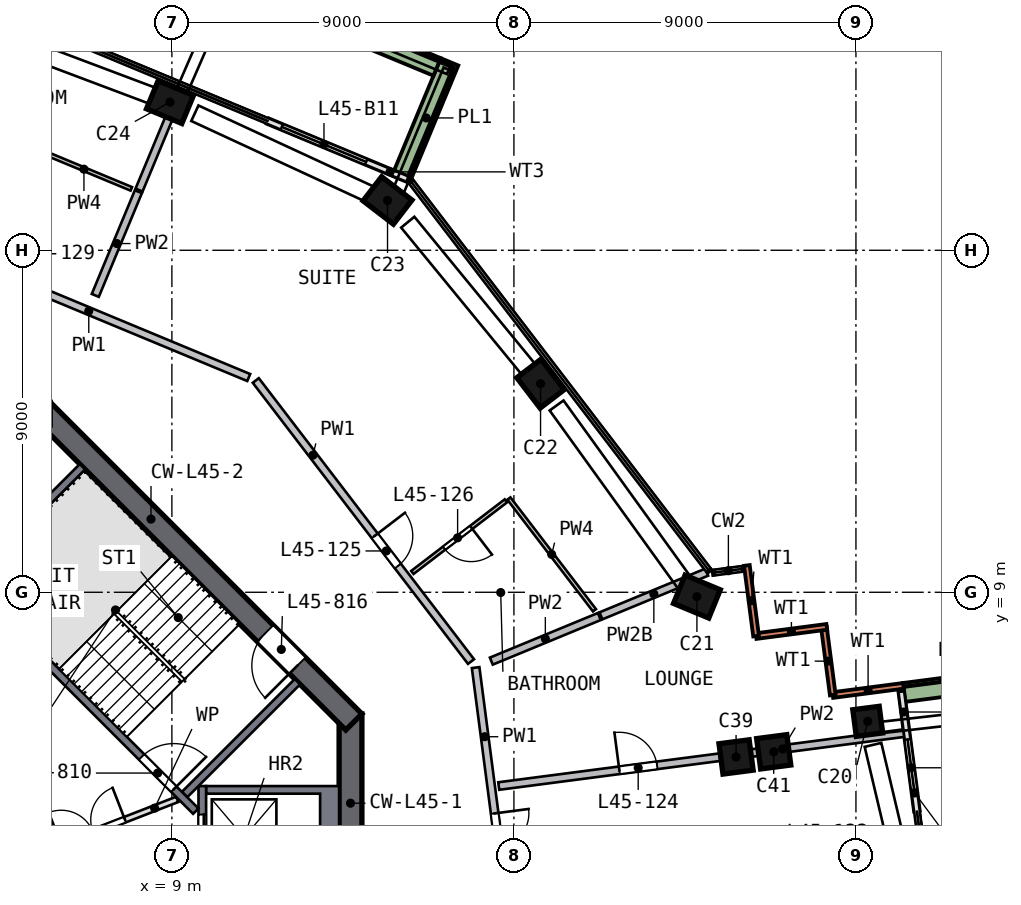
"""IFC4 building model, lengths in metres.
Left out: names, types, materials, properties, quantities, classifications, styles, units other than length and angle.
Written with IfcOpenShell. Run it as: python <this file> out.ifc"""

import sys

from ifc_helpers import new_model, si_unit, direction, frame, frame_2d, origin, origin_2d, place, context, subcontext, project, spatial, polyline, rectangle, outline, extrude, element, fill, save


model = new_model("IFC4")
c1 = context("Model", 3, precision=1e-05, world=origin(), true_north=direction((0.0, 1.0)))
c2 = subcontext(c1, "Body", "Model", "MODEL_VIEW")
j1 = project(units=[si_unit("LENGTHUNIT", "METRE"), si_unit("PLANEANGLEUNIT", "RADIAN")], contexts=[c1])
p1 = place(None, origin())
s1 = spatial("IfcSite", under=j1, at=p1, CompositionType="ELEMENT")
p2 = place(p1, origin())
s2 = spatial("IfcBuilding", under=s1, at=p2, CompositionType="ELEMENT")
p3 = place(p2, frame((0.0, 0.0, 187.0)))
s3 = spatial("IfcBuildingStorey", under=s2, at=p3, CompositionType="ELEMENT", Elevation=187.0)
p4 = place(p3, frame((27.343, 5.447, 0.0), z_axis=(-0.026931042, 0.129496589, 0.99121408), x_axis=(-0.127096321, 0.983083016, -0.131887487)))
e1 = element("IfcColumn", 1, at=p4, inside=s3, PredefinedType="COLUMN", context=c2, shape_type="SweptSolid", body=[
    extrude(rectangle(XDim=0.7, YDim=0.7, at=origin_2d()), origin(), (0.0, 0.0, 1.0), 3.218),
])
p5 = place(p3, frame((22.867, 8.755, 0.0), z_axis=(-0.042567716, 0.108395649, 0.993196039), x_axis=(0.923130304, -0.375945377, 0.080594756)))
e2 = element("IfcColumn", 2, at=p5, inside=s3, PredefinedType="COLUMN", context=c2, shape_type="SweptSolid", body=[
    extrude(rectangle(XDim=1.0, YDim=0.8, at=origin_2d()), origin(), (0.0, 0.0, 1.0), 3.212),
])
p6 = place(p3, frame((18.784, 14.383, 0.0), z_axis=(-0.069128268, 0.088748833, 0.993652317), x_axis=(-0.603927899, 0.789060783, -0.112490769)))
e3 = element("IfcColumn", 3, at=p6, inside=s3, PredefinedType="COLUMN", context=c2, shape_type="SweptSolid", body=[
    extrude(rectangle(XDim=1.0, YDim=0.8, at=origin_2d()), origin(), (0.0, 0.0, 1.0), 3.21),
])
p7 = place(p3, frame((14.785, 19.227, 0.0), z_axis=(-0.091988832, 0.069561803, 0.993327343), x_axis=(0.787183589, -0.605840039, 0.115324949)))
e4 = element("IfcColumn", 4, at=p7, inside=s3, PredefinedType="COLUMN", context=c2, shape_type="SweptSolid", body=[
    extrude(rectangle(XDim=1.0, YDim=0.8, at=origin_2d()), origin(), (0.0, 0.0, 1.0), 3.211),
])
p8 = place(p3, frame((9.076, 21.848, 0.0), z_axis=(-0.104262249, 0.042358915, 0.993647375), x_axis=(-0.917367434, 0.381802301, -0.112534412)))
e5 = element("IfcColumn", 5, at=p8, inside=s3, PredefinedType="COLUMN", context=c2, shape_type="SweptSolid", body=[
    extrude(rectangle(XDim=1.0, YDim=0.8, at=origin_2d()), origin(), (0.0, 0.0, 1.0), 3.21),
])
p9 = place(p3, frame((23.873, 4.529, 0.0), z_axis=(-0.022502444, 0.113348458, 0.993300441), x_axis=(0.991425484, 0.130453641, 0.007573516)))
e6 = element("IfcColumn", 6, at=p9, inside=s3, PredefinedType="COLUMN", context=c2, shape_type="SweptSolid", body=[
    extrude(rectangle(XDim=0.8, YDim=0.8, at=origin_2d()), origin(), (0.0, 0.0, 1.0), 3.211),
])
p10 = place(p3, frame((24.865, 4.659, 0.0), z_axis=(-0.023173643, 0.117995632, 0.992743679), x_axis=(0.991390473, 0.130717602, 0.007605209)))
e7 = element("IfcColumn", 7, at=p10, inside=s3, PredefinedType="COLUMN", context=c2, shape_type="SweptSolid", body=[
    extrude(rectangle(XDim=0.8, YDim=0.8, at=origin_2d()), origin(), (0.0, 0.0, 1.0), 3.213),
])
p11 = place(p3, frame((13.7, -5.799, 0.0), z_axis=(0.0, 0.0, 1.0), x_axis=(0.0, 1.0, 0.0)))
e8 = element("IfcWall", 8, at=p11, inside=s3, PredefinedType="SHEAR", context=c2, shape_type="SweptSolid", body=[
    extrude(rectangle(XDim=11.598, YDim=0.6, at=frame_2d((5.799, 0.0))), origin(), (0.0, 0.0, 1.0), 3.5),
])
p12 = place(p11, frame((4.899, 0.0, 0.0)))
e9 = element("IfcOpeningElement", 9, at=p12, cuts=e8, PredefinedType="OPENING", context=c2, shape_type="SweptSolid", body=[
    extrude(rectangle(XDim=1.8, YDim=2.1, at=frame_2d((0.9, 1.05))), frame((0.0, 0.31, 0.0), z_axis=(0.0, -1.0, 0.0), x_axis=(1.0, 0.0, 0.0)), (0.0, 0.0, 1.0), 0.62),
])
p13 = place(p3, frame((13.788, 5.587, 0.0), z_axis=(0.0, 0.0, 1.0), x_axis=(-0.707106781, 0.707106781, 0.0)))
e10 = element("IfcWall", 10, at=p13, inside=s3, PredefinedType="SHEAR", context=c2, shape_type="SweptSolid", body=[
    extrude(rectangle(XDim=11.598, YDim=0.6, at=frame_2d((5.799, 0.0))), origin(), (0.0, 0.0, 1.0), 3.5),
])
p14 = place(p13, frame((2.099, 0.0, 0.0)))
e11 = element("IfcOpeningElement", 11, at=p14, cuts=e10, PredefinedType="OPENING", context=c2, shape_type="SweptSolid", body=[
    extrude(rectangle(XDim=1.2, YDim=2.1, at=frame_2d((0.6, 1.05))), frame((0.0, 0.31, 0.0), z_axis=(0.0, -1.0, 0.0), x_axis=(1.0, 0.0, 0.0)), (0.0, 0.0, 1.0), 0.62),
])
p15 = place(p3, frame((28.25, 6.538, 0.0), z_axis=(0.0, 0.0, 1.0), x_axis=(-0.991571342, -0.12956185, 0.0)))
e12 = element("IfcWall", 12, at=p15, inside=s3, PredefinedType="SOLIDWALL", context=c2, shape_type="SweptSolid", body=[
    extrude(rectangle(XDim=1.875, YDim=0.15, at=frame_2d((0.938, 0.0))), origin(), (0.0, 0.0, 1.0), 3.19),
])
p16 = place(p3, frame((26.39, 6.295, 0.0), z_axis=(0.0, 0.0, 1.0), x_axis=(-0.129524725, 0.991576193, 0.0)))
e13 = element("IfcWall", 13, at=p16, inside=s3, PredefinedType="SOLIDWALL", context=c2, shape_type="SweptSolid", body=[
    extrude(rectangle(XDim=1.8, YDim=0.15, at=frame_2d((0.9, 0.0))), origin(), (0.0, 0.0, 1.0), 3.19),
])
for number, where, z_axis, x_axis in (
    (14, (26.232, 8.09, 0.0), (0.0, 0.0, 1.0), (-0.992, -0.13, 0.0)),
    (15, (24.372, 7.847, 0.0), (0.0, 0.0, 1.0), (-0.129, 0.992, 0.0)),
):
    element("IfcWall", number, at=place(p3, frame(where, z_axis=z_axis, x_axis=x_axis)), inside=s3, PredefinedType="SOLIDWALL", context=c2, shape_type="SweptSolid", body=[
        extrude(rectangle(XDim=1.875, YDim=0.15, at=frame_2d((0.938, 0.0))), origin(), (0.0, 0.0, 1.0), 3.19),
    ])
p17 = place(p3, frame((28.604, 3.241, 0.0), z_axis=(0.0, 0.0, 1.0), x_axis=(-0.129491122, 0.991580581, 0.0)))
e16 = element("IfcWall", 16, at=p17, inside=s3, PredefinedType="SOLIDWALL", context=c2, shape_type="SweptSolid", body=[
    extrude(rectangle(XDim=3.16, YDim=0.15, at=frame_2d((1.58, 0.0))), origin(), (0.0, 0.0, 1.0), 2.475),
])
p18 = place(p17, frame((0.4, 0.0, 0.0)))
e17 = element("IfcOpeningElement", 17, at=p18, cuts=e16, PredefinedType="OPENING", context=c2, shape_type="SweptSolid", body=[
    extrude(rectangle(XDim=1.5, YDim=2.4, at=frame_2d((0.75, 1.2))), frame((0.0, 0.085, 0.0), z_axis=(0.0, -1.0, 0.0), x_axis=(1.0, 0.0, 0.0)), (0.0, 0.0, 1.0), 0.17),
])
p19 = place(p3, frame((15.188, 19.877, 0.0), z_axis=(0.0, 0.0, 1.0), x_axis=(-0.923480616, 0.383645086, 0.0)))
e18 = element("IfcWall", 18, at=p19, inside=s3, PredefinedType="SOLIDWALL", context=c2, shape_type="SweptSolid", body=[
    extrude(rectangle(XDim=3.967, YDim=0.15, at=frame_2d((1.983, 0.0))), origin(), (0.0, 0.0, 1.0), 2.475),
])
p20 = place(p19, frame((1.167, 0.0, 0.0)))
e19 = element("IfcOpeningElement", 19, at=p20, cuts=e18, PredefinedType="OPENING", context=c2, shape_type="SweptSolid", body=[
    extrude(rectangle(XDim=2.4, YDim=2.4, at=frame_2d((1.2, 1.2))), frame((0.0, 0.085, 0.0), z_axis=(0.0, -1.0, 0.0), x_axis=(1.0, 0.0, 0.0)), (0.0, 0.0, 1.0), 0.17),
])
p21 = place(p3, frame((30.949, 6.714, 0.0), z_axis=(0.0, 0.0, 1.0), x_axis=(-0.991575172, -0.129532535, 0.0)))
e20 = element("IfcWall", 20, at=p21, inside=s3, PredefinedType="SOLIDWALL", context=c2, shape_type="SweptSolid", body=[
    extrude(rectangle(XDim=2.699, YDim=0.5, at=frame_2d((1.35, 0.0))), origin(), (0.0, 0.0, 1.0), 0.7),
])
p22 = place(p3, frame((15.079, 20.005, 0.0), z_axis=(0.0, 0.0, 1.0), x_axis=(0.383634365, 0.92348507, 0.0)))
e21 = element("IfcWall", 21, at=p22, inside=s3, PredefinedType="SOLIDWALL", context=c2, shape_type="SweptSolid", body=[
    extrude(rectangle(XDim=3.199, YDim=0.5, at=frame_2d((1.6, 0.0))), origin(), (0.0, 0.0, 1.0), 0.7),
])
p23 = place(p3, frame((15.979, 22.824, 0.0), z_axis=(0.0, 0.0, 1.0), x_axis=(-0.923475181, 0.383658168, 0.0)))
e22 = element("IfcWall", 22, at=p23, inside=s3, PredefinedType="SOLIDWALL", context=c2, shape_type="SweptSolid", body=[
    extrude(rectangle(XDim=13.223, YDim=0.5, at=frame_2d((6.612, 0.0))), origin(), (0.0, 0.0, 1.0), 0.7),
])
p24 = place(p3, origin())
e23 = element("IfcWall", 23, at=p24, inside=s3, PredefinedType="SOLIDWALL", context=c2, shape_type="SweptSolid", body=[
    extrude(outline(polyline([(13.4, 3.9), (13.4, 1.2), (9.9, 1.2), (9.9, 1.4), (12.9, 1.4), (12.9, 3.7), (9.9, 3.7), (9.9, 3.9), (13.4, 3.9)])), origin(), (0.0, 0.0, 1.0), 3.19),
])
p25 = place(p3, frame((9.8, 1.2, 0.0), z_axis=(0.0, 0.0, 1.0), x_axis=(0.0, 1.0, 0.0)))
e24 = element("IfcWall", 24, at=p25, inside=s3, PredefinedType="SOLIDWALL", context=c2, shape_type="SweptSolid", body=[
    extrude(rectangle(XDim=2.7, YDim=0.2, at=frame_2d((1.35, 0.0))), origin(), (0.0, 0.0, 1.0), 3.19),
])
p26 = place(p25, frame((0.75, 0.0, 0.0)))
e25 = element("IfcOpeningElement", 25, at=p26, cuts=e24, PredefinedType="OPENING", context=c2, shape_type="SweptSolid", body=[
    extrude(rectangle(XDim=1.2, YDim=2.1, at=frame_2d((0.6, 1.05))), frame((0.0, 0.11, 0.0), z_axis=(0.0, -1.0, 0.0), x_axis=(1.0, 0.0, 0.0)), (0.0, 0.0, 1.0), 0.22),
])
p27 = place(p3, frame((3.24, 9.629, 0.0), z_axis=(0.0, 0.0, 1.0), x_axis=(0.707106781, -0.707106781, 0.0)))
e26 = element("IfcWall", 26, at=p27, inside=s3, PredefinedType="SOLIDWALL", context=c2, shape_type="SweptSolid", body=[
    extrude(rectangle(XDim=9.036, YDim=0.2, at=frame_2d((4.518, 0.0))), origin(), (0.0, 0.0, 1.0), 3.19),
])
p28 = place(p27, frame((7.018, 0.0, 0.0)))
e27 = element("IfcOpeningElement", 27, at=p28, cuts=e26, PredefinedType="OPENING", context=c2, shape_type="SweptSolid", body=[
    extrude(rectangle(XDim=1.2, YDim=2.1, at=frame_2d((0.6, 1.05))), frame((0.0, 0.11, 0.0), z_axis=(0.0, -1.0, 0.0), x_axis=(1.0, 0.0, 0.0)), (0.0, 0.0, 1.0), 0.22),
])
for number, where, z_axis, x_axis in (
    (28, (9.334, 3.677, 0.0), (0.0, 0.0, 1.0), (0.707, 0.707, 0.0)),
    (29, (3.677, 9.334, 0.0), (0.0, 0.0, 1.0), (0.707, 0.707, 0.0)),
):
    element("IfcWall", number, at=place(p3, frame(where, z_axis=z_axis, x_axis=x_axis)), inside=s3, PredefinedType="SOLIDWALL", context=c2, shape_type="SweptSolid", body=[
        extrude(rectangle(XDim=4.2, YDim=0.2, at=frame_2d((2.1, 0.0))), origin(), (0.0, 0.0, 1.0), 3.19),
    ])
p29 = place(p3, frame((4.782, 1.857, 0.0), z_axis=(0.0, 0.0, 1.0), x_axis=(0.932157474, 0.362053096, 0.0)))
e30 = element("IfcWall", 30, at=p29, inside=s3, PredefinedType="PARTITIONING", context=c2, shape_type="SweptSolid", body=[
    extrude(rectangle(XDim=4.675, YDim=0.15, at=frame_2d((2.337, 0.0))), origin(), (0.0, 0.0, 1.0), 3.19),
])
p30 = place(p29, frame((1.4, 0.0, 0.0)))
e31 = element("IfcOpeningElement", 31, at=p30, cuts=e30, PredefinedType="OPENING", context=c2, shape_type="SweptSolid", body=[
    extrude(rectangle(XDim=1.8, YDim=2.1, at=frame_2d((0.9, 1.05))), frame((0.0, 0.085, 0.0), z_axis=(0.0, -1.0, 0.0), x_axis=(1.0, 0.0, 0.0)), (0.0, 0.0, 1.0), 0.17),
])
p31 = place(p3, frame((11.022, 14.651, 0.0), z_axis=(0.0, 0.0, 1.0), x_axis=(-0.923480514, 0.383645333, 0.0)))
e32 = element("IfcWall", 32, at=p31, inside=s3, PredefinedType="SOLIDWALL", context=c2, shape_type="SweptSolid", body=[
    extrude(rectangle(XDim=9.116, YDim=0.2, at=frame_2d((4.558, 0.0))), origin(), (0.0, 0.0, 1.0), 3.19),
])
p32 = place(p3, frame((11.208, 14.573, 0.0), z_axis=(0.0, 0.0, 1.0), x_axis=(0.607928573, -0.793991719, 0.0)))
e33 = element("IfcWall", 33, at=p32, inside=s3, PredefinedType="SOLIDWALL", context=c2, shape_type="SweptSolid", body=[
    extrude(rectangle(XDim=9.316, YDim=0.2, at=frame_2d((4.658, 0.0))), origin(), (0.0, 0.0, 1.0), 3.19),
])
p33 = place(p32, frame((5.15, 0.0, 0.0)))
e34 = element("IfcOpeningElement", 34, at=p33, cuts=e33, PredefinedType="OPENING", context=c2, shape_type="SweptSolid", body=[
    extrude(rectangle(XDim=1.0, YDim=2.1, at=frame_2d((0.5, 1.05))), frame((0.0, 0.11, 0.0), z_axis=(0.0, -1.0, 0.0), x_axis=(1.0, 0.0, 0.0)), (0.0, 0.0, 1.0), 0.22),
])
p34 = place(p3, frame((16.993, 7.018, 0.0), z_axis=(0.0, 0.0, 1.0), x_axis=(0.129502741, -0.991579064, 0.0)))
e35 = element("IfcWall", 35, at=p34, inside=s3, PredefinedType="SOLIDWALL", context=c2, shape_type="SweptSolid", body=[
    extrude(rectangle(XDim=9.317, YDim=0.2, at=frame_2d((4.658, 0.0))), origin(), (0.0, 0.0, 1.0), 3.19),
])
p35 = place(p34, frame((3.869, 0.0, 0.0)))
e36 = element("IfcOpeningElement", 36, at=p35, cuts=e35, PredefinedType="OPENING", context=c2, shape_type="SweptSolid", body=[
    extrude(rectangle(XDim=1.8, YDim=2.1, at=frame_2d((0.9, 1.05))), frame((0.0, 0.11, 0.0), z_axis=(0.0, -1.0, 0.0), x_axis=(1.0, 0.0, 0.0)), (0.0, 0.0, 1.0), 0.22),
])
p36 = place(p3, frame((6.985, 16.812, 0.0), z_axis=(0.0, 0.0, 1.0), x_axis=(0.383652947, 0.92347735, 0.0)))
e37 = element("IfcWall", 37, at=p36, inside=s3, PredefinedType="SOLIDWALL", context=c2, shape_type="SweptSolid", body=[
    extrude(rectangle(XDim=2.955, YDim=0.2, at=frame_2d((1.477, 0.0))), origin(), (0.0, 0.0, 1.0), 3.19),
])
p37 = place(p3, frame((8.136, 19.583, 0.0), z_axis=(0.0, 0.0, 1.0), x_axis=(0.383701253, 0.92345728, 0.0)))
e38 = element("IfcWall", 38, at=p37, inside=s3, PredefinedType="SOLIDWALL", context=c2, shape_type="SweptSolid", body=[
    extrude(rectangle(XDim=2.902, YDim=0.2, at=frame_2d((1.451, 0.0))), origin(), (0.0, 0.0, 1.0), 3.19),
])
p38 = place(p3, frame((17.406, 7.188, 0.0), z_axis=(0.0, 0.0, 1.0), x_axis=(0.92428457, 0.381704118, 0.0)))
e39 = element("IfcWall", 39, at=p38, inside=s3, PredefinedType="SOLIDWALL", context=c2, shape_type="SweptSolid", body=[
    extrude(rectangle(XDim=3.075, YDim=0.2, at=frame_2d((1.537, 0.0))), origin(), (0.0, 0.0, 1.0), 3.19),
])
p39 = place(p3, frame((20.29, 8.38, 0.0), z_axis=(0.0, 0.0, 1.0), x_axis=(0.924264536, 0.381752627, 0.0)))
e40 = element("IfcWall", 40, at=p39, inside=s3, PredefinedType="SOLIDWALL", context=c2, shape_type="SweptSolid", body=[
    extrude(rectangle(XDim=3.011, YDim=0.2, at=frame_2d((1.506, 0.0))), origin(), (0.0, 0.0, 1.0), 2.69),
])
p40 = place(p3, frame((17.601, 3.901, 0.0), z_axis=(0.0, 0.0, 1.0), x_axis=(0.991580137, 0.129494525, 0.0)))
e41 = element("IfcWall", 41, at=p40, inside=s3, PredefinedType="SOLIDWALL", context=c2, shape_type="SweptSolid", body=[
    extrude(rectangle(XDim=10.75, YDim=0.2, at=frame_2d((5.375, 0.0))), origin(), (0.0, 0.0, 1.0), 3.19),
])
p41 = place(p40, frame((3.2, 0.0, 0.0)))
e42 = element("IfcOpeningElement", 42, at=p41, cuts=e41, PredefinedType="OPENING", context=c2, shape_type="SweptSolid", body=[
    extrude(rectangle(XDim=1.0, YDim=2.1, at=frame_2d((0.5, 1.05))), frame((0.0, 0.11, 0.0), z_axis=(0.0, -1.0, 0.0), x_axis=(1.0, 0.0, 0.0)), (0.0, 0.0, 1.0), 0.22),
])
p42 = place(p3, frame((7.933, 19.616, 0.0), z_axis=(0.0, 0.0, 1.0), x_axis=(-0.923475031, 0.383658529, 0.0)))
e43 = element("IfcWall", 43, at=p42, inside=s3, PredefinedType="PARTITIONING", context=c2, shape_type="SweptSolid", body=[
    extrude(rectangle(XDim=2.7, YDim=0.1, at=frame_2d((1.35, 0.0))), origin(), (0.0, 0.0, 1.0), 3.19),
])
p43 = place(p3, frame((17.789, 11.406, 0.0), z_axis=(0.0, 0.0, 1.0), x_axis=(-0.793968729, -0.607958598, 0.0)))
e44 = element("IfcWall", 44, at=p43, inside=s3, PredefinedType="PARTITIONING", context=c2, shape_type="SweptSolid", body=[
    extrude(rectangle(XDim=3.1, YDim=0.1, at=frame_2d((1.55, 0.0))), origin(), (0.0, 0.0, 1.0), 3.19),
])
p44 = place(p43, frame((1.15, 0.0, 0.0)))
e45 = element("IfcOpeningElement", 45, at=p44, cuts=e44, PredefinedType="OPENING", context=c2, shape_type="SweptSolid", body=[
    extrude(rectangle(XDim=0.9, YDim=2.1, at=frame_2d((0.45, 1.05))), frame((0.0, 0.06, 0.0), z_axis=(0.0, -1.0, 0.0), x_axis=(1.0, 0.0, 0.0)), (0.0, 0.0, 1.0), 0.12),
])
p45 = place(p3, frame((17.868, 11.467, 0.0), z_axis=(0.0, 0.0, 1.0), x_axis=(0.60792219, -0.793996606, 0.0)))
e46 = element("IfcWall", 46, at=p45, inside=s3, PredefinedType="PARTITIONING", context=c2, shape_type="SweptSolid", body=[
    extrude(rectangle(XDim=3.704, YDim=0.1, at=frame_2d((1.852, 0.0))), origin(), (0.0, 0.0, 1.0), 3.19),
])
p46 = place(p18, origin())
e47 = element("IfcDoor", 47, at=p46, inside=s3, OperationType="SLIDING_TO_RIGHT", PredefinedType="DOOR", context=c2, shape_type="SweptSolid", body=[
    extrude(rectangle(XDim=1.5, YDim=2.4, at=frame_2d((0.75, 1.2))), frame((0.0, 0.025, 0.0), z_axis=(0.0, -1.0, 0.0), x_axis=(1.0, 0.0, 0.0)), (0.0, 0.0, 1.0), 0.05),
])
fill(e17, e47)
p47 = place(p20, origin())
e48 = element("IfcDoor", 48, at=p47, inside=s3, OperationType="SLIDING_TO_LEFT", PredefinedType="DOOR", context=c2, shape_type="SweptSolid", body=[
    extrude(rectangle(XDim=2.4, YDim=2.4, at=frame_2d((1.2, 1.2))), frame((0.0, 0.025, 0.0), z_axis=(0.0, -1.0, 0.0), x_axis=(1.0, 0.0, 0.0)), (0.0, 0.0, 1.0), 0.05),
])
fill(e19, e48)
p48 = place(p26, origin())
e49 = element("IfcDoor", 49, at=p48, inside=s3, OperationType="DOUBLE_DOOR_SLIDING", PredefinedType="DOOR", context=c2, shape_type="SweptSolid", body=[
    extrude(rectangle(XDim=1.2, YDim=2.1, at=frame_2d((0.6, 1.05))), frame((0.0, 0.025, 0.0), z_axis=(0.0, -1.0, 0.0), x_axis=(1.0, 0.0, 0.0)), (0.0, 0.0, 1.0), 0.05),
])
fill(e25, e49)
p49 = place(p28, origin())
e50 = element("IfcDoor", 50, at=p49, inside=s3, OperationType="SINGLE_SWING_RIGHT", PredefinedType="DOOR", context=c2, shape_type="SweptSolid", body=[
    extrude(rectangle(XDim=1.2, YDim=2.1, at=frame_2d((0.6, 1.05))), frame((0.0, 0.025, 0.0), z_axis=(0.0, -1.0, 0.0), x_axis=(1.0, 0.0, 0.0)), (0.0, 0.0, 1.0), 0.05),
])
fill(e27, e50)
p50 = place(p14, origin())
e51 = element("IfcDoor", 51, at=p50, inside=s3, OperationType="SINGLE_SWING_LEFT", PredefinedType="DOOR", context=c2, shape_type="SweptSolid", body=[
    extrude(rectangle(XDim=1.2, YDim=2.1, at=frame_2d((0.6, 1.05))), frame((0.0, 0.025, 0.0), z_axis=(0.0, -1.0, 0.0), x_axis=(1.0, 0.0, 0.0)), (0.0, 0.0, 1.0), 0.05),
])
fill(e11, e51)
p51 = place(p30, origin())
e52 = element("IfcDoor", 52, at=p51, inside=s3, OperationType="DOUBLE_DOOR_SINGLE_SWING", PredefinedType="DOOR", context=c2, shape_type="SweptSolid", body=[
    extrude(rectangle(XDim=1.8, YDim=2.1, at=frame_2d((0.9, 1.05))), frame((0.0, 0.025, 0.0), z_axis=(0.0, -1.0, 0.0), x_axis=(1.0, 0.0, 0.0)), (0.0, 0.0, 1.0), 0.05),
])
fill(e31, e52)
p52 = place(p35, origin())
e53 = element("IfcDoor", 53, at=p52, inside=s3, OperationType="DOUBLE_DOOR_SINGLE_SWING", PredefinedType="DOOR", context=c2, shape_type="SweptSolid", body=[
    extrude(rectangle(XDim=1.8, YDim=2.1, at=frame_2d((0.9, 1.05))), frame((0.0, 0.025, 0.0), z_axis=(0.0, -1.0, 0.0), x_axis=(1.0, 0.0, 0.0)), (0.0, 0.0, 1.0), 0.05),
])
fill(e36, e53)
p53 = place(p41, origin())
e54 = element("IfcDoor", 54, at=p53, inside=s3, OperationType="SINGLE_SWING_LEFT", PredefinedType="DOOR", context=c2, shape_type="SweptSolid", body=[
    extrude(rectangle(XDim=1.0, YDim=2.1, at=frame_2d((0.5, 1.05))), frame((0.0, 0.025, 0.0), z_axis=(0.0, -1.0, 0.0), x_axis=(1.0, 0.0, 0.0)), (0.0, 0.0, 1.0), 0.05),
])
fill(e42, e54)
p54 = place(p33, origin())
e55 = element("IfcDoor", 55, at=p54, inside=s3, OperationType="SINGLE_SWING_LEFT", PredefinedType="DOOR", context=c2, shape_type="SweptSolid", body=[
    extrude(rectangle(XDim=1.0, YDim=2.1, at=frame_2d((0.5, 1.05))), frame((0.0, 0.025, 0.0), z_axis=(0.0, -1.0, 0.0), x_axis=(1.0, 0.0, 0.0)), (0.0, 0.0, 1.0), 0.05),
])
fill(e34, e55)
p55 = place(p44, origin())
e56 = element("IfcDoor", 56, at=p55, inside=s3, OperationType="SINGLE_SWING_LEFT", PredefinedType="DOOR", context=c2, shape_type="SweptSolid", body=[
    extrude(rectangle(XDim=0.9, YDim=2.1, at=frame_2d((0.45, 1.05))), frame((0.0, 0.025, 0.0), z_axis=(0.0, -1.0, 0.0), x_axis=(1.0, 0.0, 0.0)), (0.0, 0.0, 1.0), 0.05),
])
fill(e45, e56)
save(model, sys.argv[1])
